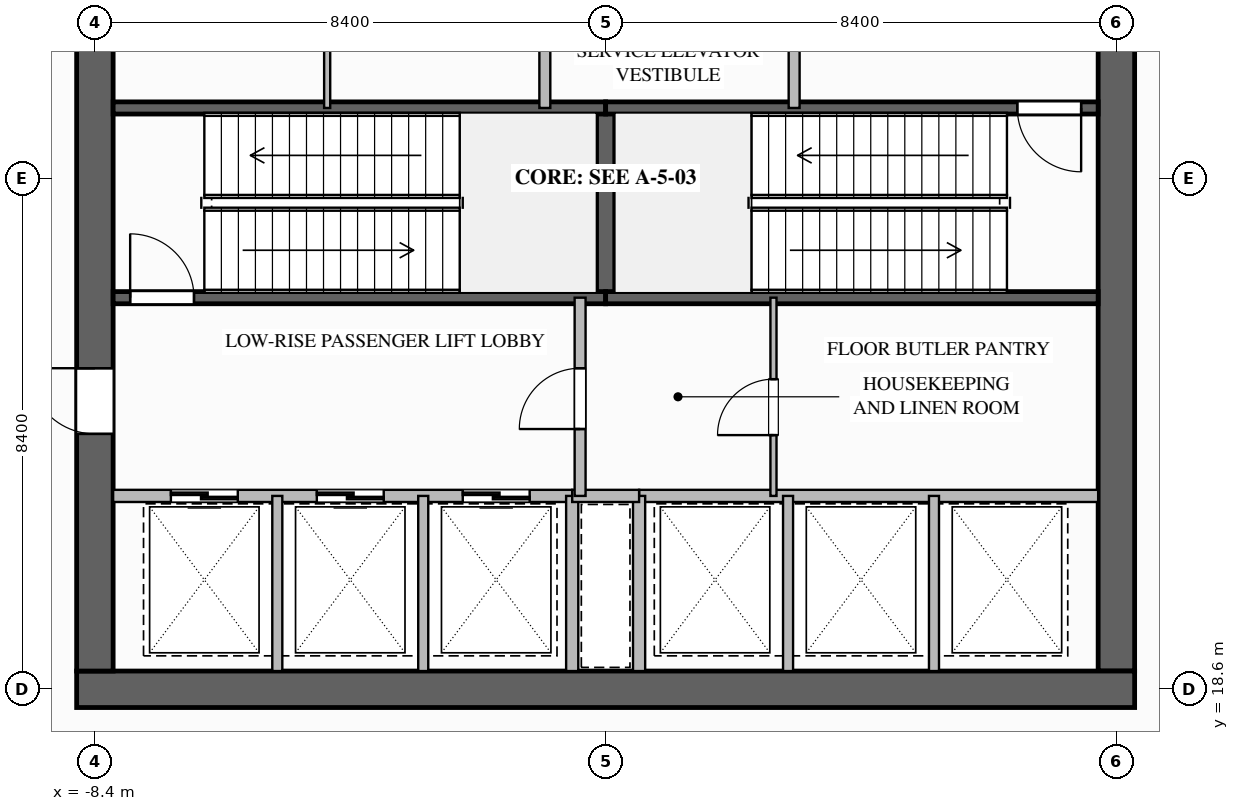
"""IFC4 building model, lengths in metres.
Left out: names, types, materials, properties, quantities, classifications, styles, units other than length and angle.
Written with IfcOpenShell. Run it as: python <this file> out.ifc"""

import sys

from ifc_helpers import new_model, si_unit, direction, frame, frame_2d, origin, place, context, subcontext, project, spatial, rectangle, extrude, element, fill, save


model = new_model("IFC4")
c1 = context("Model", 3, precision=1e-05, world=origin(), true_north=direction((0.0, 1.0)))
c2 = subcontext(c1, "Body", "Model", "MODEL_VIEW")
j1 = project(units=[si_unit("LENGTHUNIT", "METRE"), si_unit("PLANEANGLEUNIT", "RADIAN")], contexts=[c1])
p1 = place(None, origin())
s1 = spatial("IfcSite", under=j1, at=p1, CompositionType="ELEMENT")
p2 = place(p1, origin())
s2 = spatial("IfcBuilding", under=s1, at=p2, CompositionType="ELEMENT")
p3 = place(p2, frame((0.0, 0.0, 27.6)))
s3 = spatial("IfcBuildingStorey", under=s2, at=p3, CompositionType="ELEMENT", Elevation=27.6)
p4 = place(p3, frame((8.4, 35.1, 0.0), z_axis=(0.0, 0.0, 1.0), x_axis=(0.0, -1.0, 0.0)))
e1 = element("IfcWall", 1, at=p4, inside=s3, PredefinedType="SHEAR", context=c2, shape_type="SweptSolid", body=[
    extrude(rectangle(XDim=16.2, YDim=0.6, at=frame_2d((8.1, 0.0))), origin(), (0.0, 0.0, 1.0), 5.6),
])
p5 = place(p4, frame((3.08, 0.0, 0.0)))
e2 = element("IfcOpeningElement", 2, at=p5, cuts=e1, PredefinedType="OPENING", context=c2, shape_type="SweptSolid", body=[
    extrude(rectangle(XDim=1.12, YDim=2.1, at=frame_2d((0.56, 1.05))), frame((0.0, 0.31, 0.0), z_axis=(0.0, -1.0, 0.0), x_axis=(1.0, 0.0, 0.0)), (0.0, 0.0, 1.0), 0.62),
])
p6 = place(p3, frame((8.7, 18.6, 0.0), z_axis=(0.0, 0.0, 1.0), x_axis=(-1.0, 0.0, 0.0)))
e3 = element("IfcWall", 3, at=p6, inside=s3, PredefinedType="SHEAR", context=c2, shape_type="SweptSolid", body=[
    extrude(rectangle(XDim=17.4, YDim=0.6, at=frame_2d((8.7, 0.0))), origin(), (0.0, 0.0, 1.0), 5.6),
])
p7 = place(p3, frame((-8.4, 18.9, 0.0), z_axis=(0.0, 0.0, 1.0), x_axis=(0.0, 1.0, 0.0)))
e4 = element("IfcWall", 4, at=p7, inside=s3, PredefinedType="SHEAR", context=c2, shape_type="SweptSolid", body=[
    extrude(rectangle(XDim=16.2, YDim=0.6, at=frame_2d((8.1, 0.0))), origin(), (0.0, 0.0, 1.0), 5.6),
])
p8 = place(p7, frame((3.9, 0.0, 0.0)))
e5 = element("IfcOpeningElement", 5, at=p8, cuts=e4, PredefinedType="OPENING", context=c2, shape_type="SweptSolid", body=[
    extrude(rectangle(XDim=1.08, YDim=2.04, at=frame_2d((0.54, 1.02))), frame((0.0, 0.31, 0.0), z_axis=(0.0, -1.0, 0.0), x_axis=(1.0, 0.0, 0.0)), (0.0, 0.0, 1.0), 0.62),
])
p9 = place(p3, frame((0.0, 25.04, 0.0), z_axis=(0.0, 0.0, 1.0), x_axis=(0.0, 1.0, 0.0)))
e6 = element("IfcWall", 6, at=p9, inside=s3, PredefinedType="SOLIDWALL", context=c2, shape_type="SweptSolid", body=[
    extrude(rectangle(XDim=3.12, YDim=0.3, at=frame_2d((1.56, 0.0))), origin(), (0.0, 0.0, 1.0), 5.32),
])
p10 = place(p3, frame((-8.1, 25.04, 0.0), z_axis=(0.0, 0.0, 1.0), x_axis=(1.0, 0.0, 0.0)))
e7 = element("IfcWall", 7, at=p10, inside=s3, PredefinedType="SOLIDWALL", context=c2, shape_type="SweptSolid", body=[
    extrude(rectangle(XDim=8.1, YDim=0.2, at=frame_2d((4.05, 0.0))), origin(), (0.0, 0.0, 1.0), 5.32),
])
p11 = place(p10, frame((0.28, 0.0, 0.0)))
e8 = element("IfcOpeningElement", 8, at=p11, cuts=e7, PredefinedType="OPENING", context=c2, shape_type="SweptSolid", body=[
    extrude(rectangle(XDim=1.05, YDim=2.1, at=frame_2d((0.525, 1.05))), frame((0.0, 0.11, 0.0), z_axis=(0.0, -1.0, 0.0), x_axis=(1.0, 0.0, 0.0)), (0.0, 0.0, 1.0), 0.22),
])
for number, where, z_axis, x_axis in (
    (9, (-8.1, 28.16, 0.0), (0.0, 0.0, 1.0), (1.0, 0.0, 0.0)),
    (10, (0.0, 25.04, 0.0), (0.0, 0.0, 1.0), (1.0, 0.0, 0.0)),
):
    element("IfcWall", number, at=place(p3, frame(where, z_axis=z_axis, x_axis=x_axis)), inside=s3, PredefinedType="SOLIDWALL", context=c2, shape_type="SweptSolid", body=[
        extrude(rectangle(XDim=8.1, YDim=0.2, at=frame_2d((4.05, 0.0))), origin(), (0.0, 0.0, 1.0), 5.32),
    ])
p12 = place(p3, frame((8.1, 28.16, 0.0), z_axis=(0.0, 0.0, 1.0), x_axis=(-1.0, 0.0, 0.0)))
e11 = element("IfcWall", 11, at=p12, inside=s3, PredefinedType="SOLIDWALL", context=c2, shape_type="SweptSolid", body=[
    extrude(rectangle(XDim=8.1, YDim=0.2, at=frame_2d((4.05, 0.0))), origin(), (0.0, 0.0, 1.0), 5.32),
])
p13 = place(p12, frame((0.28, 0.0, 0.0)))
e12 = element("IfcOpeningElement", 12, at=p13, cuts=e11, PredefinedType="OPENING", context=c2, shape_type="SweptSolid", body=[
    extrude(rectangle(XDim=1.05, YDim=2.1, at=frame_2d((0.525, 1.05))), frame((0.0, 0.11, 0.0), z_axis=(0.0, -1.0, 0.0), x_axis=(1.0, 0.0, 0.0)), (0.0, 0.0, 1.0), 0.22),
])
p14 = place(p3, frame((3.1, 28.16, 0.0), z_axis=(0.0, 0.0, 1.0), x_axis=(0.0, 1.0, 0.0)))
e13 = element("IfcWall", 13, at=p14, inside=s3, PredefinedType="SOLIDWALL", context=c2, shape_type="SweptSolid", body=[
    extrude(rectangle(XDim=4.06, YDim=0.18, at=frame_2d((2.03, 0.0))), origin(), (0.0, 0.0, 1.0), 5.32),
])
p15 = place(p14, frame((1.4, 0.0, 0.0)))
e14 = element("IfcOpeningElement", 14, at=p15, cuts=e13, PredefinedType="OPENING", context=c2, shape_type="SweptSolid", body=[
    extrude(rectangle(XDim=1.12, YDim=2.1, at=frame_2d((0.56, 1.05))), frame((0.0, 0.1, 0.0), z_axis=(0.0, -1.0, 0.0), x_axis=(1.0, 0.0, 0.0)), (0.0, 0.0, 1.0), 0.2),
])
p16 = place(p3, frame((-1.0, 28.16, 0.0), z_axis=(0.0, 0.0, 1.0), x_axis=(0.0, 1.0, 0.0)))
e15 = element("IfcWall", 15, at=p16, inside=s3, PredefinedType="SOLIDWALL", context=c2, shape_type="SweptSolid", body=[
    extrude(rectangle(XDim=4.02, YDim=0.18, at=frame_2d((2.01, 0.0))), origin(), (0.0, 0.0, 1.0), 5.32),
])
p17 = place(p16, frame((1.4, 0.0, 0.0)))
e16 = element("IfcOpeningElement", 16, at=p17, cuts=e15, PredefinedType="OPENING", context=c2, shape_type="SweptSolid", body=[
    extrude(rectangle(XDim=1.0, YDim=2.1, at=frame_2d((0.5, 1.05))), frame((0.0, 0.1, 0.0), z_axis=(0.0, -1.0, 0.0), x_axis=(1.0, 0.0, 0.0)), (0.0, 0.0, 1.0), 0.2),
])
p18 = place(p3, frame((-4.58, 28.16, 0.0), z_axis=(0.0, 0.0, 1.0), x_axis=(0.0, 1.0, 0.0)))
e17 = element("IfcWall", 17, at=p18, inside=s3, PredefinedType="PARTITIONING", context=c2, shape_type="SweptSolid", body=[
    extrude(rectangle(XDim=4.06, YDim=0.1, at=frame_2d((2.03, 0.0))), origin(), (0.0, 0.0, 1.0), 5.32),
])
p19 = place(p18, frame((1.2, 0.0, 0.0)))
e18 = element("IfcOpeningElement", 18, at=p19, cuts=e17, PredefinedType="OPENING", context=c2, shape_type="SweptSolid", body=[
    extrude(rectangle(XDim=0.92, YDim=2.1, at=frame_2d((0.46, 1.05))), frame((0.0, 0.06, 0.0), z_axis=(0.0, -1.0, 0.0), x_axis=(1.0, 0.0, 0.0)), (0.0, 0.0, 1.0), 0.12),
])
p20 = place(p3, frame((-0.55, 21.78, 0.0), z_axis=(0.0, 0.0, 1.0), x_axis=(-1.0, 0.0, 0.0)))
e19 = element("IfcWall", 19, at=p20, inside=s3, PredefinedType="SOLIDWALL", context=c2, shape_type="SweptSolid", body=[
    extrude(rectangle(XDim=7.55, YDim=0.2, at=frame_2d((3.775, 0.0))), origin(), (0.0, 0.0, 1.0), 5.32),
])
p21 = place(p20, frame((5.5, 0.0, 0.0)))
e20 = element("IfcOpeningElement", 20, at=p21, cuts=e19, PredefinedType="OPENING", context=c2, shape_type="SweptSolid", body=[
    extrude(rectangle(XDim=1.1, YDim=2.2, at=frame_2d((0.55, 1.1))), frame((0.0, 0.11, 0.0), z_axis=(0.0, -1.0, 0.0), x_axis=(1.0, 0.0, 0.0)), (0.0, 0.0, 1.0), 0.22),
])
p22 = place(p20, frame((3.1, 0.0, 0.0)))
e21 = element("IfcOpeningElement", 21, at=p22, cuts=e19, PredefinedType="OPENING", context=c2, shape_type="SweptSolid", body=[
    extrude(rectangle(XDim=1.1, YDim=2.2, at=frame_2d((0.55, 1.1))), frame((0.0, 0.11, 0.0), z_axis=(0.0, -1.0, 0.0), x_axis=(1.0, 0.0, 0.0)), (0.0, 0.0, 1.0), 0.22),
])
p23 = place(p20, frame((0.7, 0.0, 0.0)))
e22 = element("IfcOpeningElement", 22, at=p23, cuts=e19, PredefinedType="OPENING", context=c2, shape_type="SweptSolid", body=[
    extrude(rectangle(XDim=1.1, YDim=2.2, at=frame_2d((0.55, 1.1))), frame((0.0, 0.11, 0.0), z_axis=(0.0, -1.0, 0.0), x_axis=(1.0, 0.0, 0.0)), (0.0, 0.0, 1.0), 0.22),
])
for number, where, z_axis, x_axis in (
    (23, (-5.4, 18.9, 0.0), (0.0, 0.0, 1.0), (0.0, 1.0, 0.0)),
    (24, (-3.0, 18.9, 0.0), (0.0, 0.0, 1.0), (0.0, 1.0, 0.0)),
):
    element("IfcWall", number, at=place(p3, frame(where, z_axis=z_axis, x_axis=x_axis)), inside=s3, PredefinedType="PARTITIONING", context=c2, shape_type="SweptSolid", body=[
        extrude(rectangle(XDim=2.88, YDim=0.165, at=frame_2d((1.44, 0.0))), origin(), (0.0, 0.0, 1.0), 5.32),
    ])
p24 = place(p3, frame((-0.55, 18.9, 0.0), z_axis=(0.0, 0.0, 1.0), x_axis=(0.0, 1.0, 0.0)))
e25 = element("IfcWall", 25, at=p24, inside=s3, PredefinedType="SOLIDWALL", context=c2, shape_type="SweptSolid", body=[
    extrude(rectangle(XDim=2.88, YDim=0.2, at=frame_2d((1.44, 0.0))), origin(), (0.0, 0.0, 1.0), 5.32),
])
p25 = place(p3, frame((8.1, 21.78, 0.0), z_axis=(0.0, 0.0, 1.0), x_axis=(-1.0, 0.0, 0.0)))
e26 = element("IfcWall", 26, at=p25, inside=s3, PredefinedType="SOLIDWALL", context=c2, shape_type="SweptSolid", body=[
    extrude(rectangle(XDim=7.55, YDim=0.2, at=frame_2d((3.775, 0.0))), origin(), (0.0, 0.0, 1.0), 5.32),
])
p26 = place(p3, frame((0.55, 18.9, 0.0), z_axis=(0.0, 0.0, 1.0), x_axis=(0.0, 1.0, 0.0)))
e27 = element("IfcWall", 27, at=p26, inside=s3, PredefinedType="SOLIDWALL", context=c2, shape_type="SweptSolid", body=[
    extrude(rectangle(XDim=2.88, YDim=0.2, at=frame_2d((1.44, 0.0))), origin(), (0.0, 0.0, 1.0), 5.32),
])
for number, where, z_axis, x_axis in (
    (28, (3.0, 18.9, 0.0), (0.0, 0.0, 1.0), (0.0, 1.0, 0.0)),
    (29, (5.4, 18.9, 0.0), (0.0, 0.0, 1.0), (0.0, 1.0, 0.0)),
):
    element("IfcWall", number, at=place(p3, frame(where, z_axis=z_axis, x_axis=x_axis)), inside=s3, PredefinedType="PARTITIONING", context=c2, shape_type="SweptSolid", body=[
        extrude(rectangle(XDim=2.88, YDim=0.165, at=frame_2d((1.44, 0.0))), origin(), (0.0, 0.0, 1.0), 5.32),
    ])
p27 = place(p3, frame((-0.55, 21.78, 0.0), z_axis=(0.0, 0.0, 1.0), x_axis=(1.0, 0.0, 0.0)))
e30 = element("IfcWall", 30, at=p27, inside=s3, PredefinedType="SOLIDWALL", context=c2, shape_type="SweptSolid", body=[
    extrude(rectangle(XDim=1.1, YDim=0.2, at=frame_2d((0.55, 0.0))), origin(), (0.0, 0.0, 1.0), 5.32),
])
p28 = place(p3, frame((-0.42, 21.78, 0.0), z_axis=(0.0, 0.0, 1.0), x_axis=(0.0, 1.0, 0.0)))
e31 = element("IfcWall", 31, at=p28, inside=s3, PredefinedType="SOLIDWALL", context=c2, shape_type="SweptSolid", body=[
    extrude(rectangle(XDim=3.26, YDim=0.18, at=frame_2d((1.63, 0.0))), origin(), (0.0, 0.0, 1.0), 5.32),
])
p29 = place(p28, frame((1.1, 0.0, 0.0)))
e32 = element("IfcOpeningElement", 32, at=p29, cuts=e31, PredefinedType="OPENING", context=c2, shape_type="SweptSolid", body=[
    extrude(rectangle(XDim=1.0, YDim=2.1, at=frame_2d((0.5, 1.05))), frame((0.0, 0.1, 0.0), z_axis=(0.0, -1.0, 0.0), x_axis=(1.0, 0.0, 0.0)), (0.0, 0.0, 1.0), 0.2),
])
p30 = place(p3, frame((2.76, 21.78, 0.0), z_axis=(0.0, 0.0, 1.0), x_axis=(0.0, 1.0, 0.0)))
e33 = element("IfcWall", 33, at=p30, inside=s3, PredefinedType="PARTITIONING", context=c2, shape_type="SweptSolid", body=[
    extrude(rectangle(XDim=3.26, YDim=0.1, at=frame_2d((1.63, 0.0))), origin(), (0.0, 0.0, 1.0), 5.32),
])
p31 = place(p30, frame((1.0, 0.0, 0.0)))
e34 = element("IfcOpeningElement", 34, at=p31, cuts=e33, PredefinedType="OPENING", context=c2, shape_type="SweptSolid", body=[
    extrude(rectangle(XDim=0.92, YDim=2.1, at=frame_2d((0.46, 1.05))), frame((0.0, 0.06, 0.0), z_axis=(0.0, -1.0, 0.0), x_axis=(1.0, 0.0, 0.0)), (0.0, 0.0, 1.0), 0.12),
])
p32 = place(p11, origin())
e35 = element("IfcDoor", 35, at=p32, inside=s3, OperationType="SINGLE_SWING_LEFT", PredefinedType="DOOR", context=c2, shape_type="SweptSolid", body=[
    extrude(rectangle(XDim=1.05, YDim=2.1, at=frame_2d((0.525, 1.05))), frame((0.0, 0.025, 0.0), z_axis=(0.0, -1.0, 0.0), x_axis=(1.0, 0.0, 0.0)), (0.0, 0.0, 1.0), 0.05),
])
fill(e8, e35)
p33 = place(p13, origin())
e36 = element("IfcDoor", 36, at=p33, inside=s3, OperationType="SINGLE_SWING_LEFT", PredefinedType="DOOR", context=c2, shape_type="SweptSolid", body=[
    extrude(rectangle(XDim=1.05, YDim=2.1, at=frame_2d((0.525, 1.05))), frame((0.0, 0.025, 0.0), z_axis=(0.0, -1.0, 0.0), x_axis=(1.0, 0.0, 0.0)), (0.0, 0.0, 1.0), 0.05),
])
fill(e12, e36)
p34 = place(p21, origin())
e37 = element("IfcDoor", 37, at=p34, inside=s3, OperationType="SLIDING_TO_LEFT", PredefinedType="DOOR", context=c2, shape_type="SweptSolid", body=[
    extrude(rectangle(XDim=1.1, YDim=2.2, at=frame_2d((0.55, 1.1))), frame((0.0, 0.025, 0.0), z_axis=(0.0, -1.0, 0.0), x_axis=(1.0, 0.0, 0.0)), (0.0, 0.0, 1.0), 0.05),
])
fill(e20, e37)
p35 = place(p22, origin())
e38 = element("IfcDoor", 38, at=p35, inside=s3, OperationType="SLIDING_TO_LEFT", PredefinedType="DOOR", context=c2, shape_type="SweptSolid", body=[
    extrude(rectangle(XDim=1.1, YDim=2.2, at=frame_2d((0.55, 1.1))), frame((0.0, 0.025, 0.0), z_axis=(0.0, -1.0, 0.0), x_axis=(1.0, 0.0, 0.0)), (0.0, 0.0, 1.0), 0.05),
])
fill(e21, e38)
p36 = place(p23, origin())
e39 = element("IfcDoor", 39, at=p36, inside=s3, OperationType="SLIDING_TO_LEFT", PredefinedType="DOOR", context=c2, shape_type="SweptSolid", body=[
    extrude(rectangle(XDim=1.1, YDim=2.2, at=frame_2d((0.55, 1.1))), frame((0.0, 0.025, 0.0), z_axis=(0.0, -1.0, 0.0), x_axis=(1.0, 0.0, 0.0)), (0.0, 0.0, 1.0), 0.05),
])
fill(e22, e39)
p37 = place(p29, origin())
e40 = element("IfcDoor", 40, at=p37, inside=s3, OperationType="SINGLE_SWING_LEFT", PredefinedType="DOOR", context=c2, shape_type="SweptSolid", body=[
    extrude(rectangle(XDim=1.0, YDim=2.1, at=frame_2d((0.5, 1.05))), frame((0.0, 0.025, 0.0), z_axis=(0.0, -1.0, 0.0), x_axis=(1.0, 0.0, 0.0)), (0.0, 0.0, 1.0), 0.05),
])
fill(e32, e40)
p38 = place(p8, origin())
e41 = element("IfcDoor", 41, at=p38, inside=s3, OperationType="SINGLE_SWING_RIGHT", PredefinedType="DOOR", context=c2, shape_type="SweptSolid", body=[
    extrude(rectangle(XDim=1.08, YDim=2.04, at=frame_2d((0.54, 1.02))), frame((0.0, 0.025, 0.0), z_axis=(0.0, -1.0, 0.0), x_axis=(1.0, 0.0, 0.0)), (0.0, 0.0, 1.0), 0.05),
])
fill(e5, e41)
p39 = place(p31, origin())
e42 = element("IfcDoor", 42, at=p39, inside=s3, OperationType="SINGLE_SWING_LEFT", PredefinedType="DOOR", context=c2, shape_type="SweptSolid", body=[
    extrude(rectangle(XDim=0.92, YDim=2.1, at=frame_2d((0.46, 1.05))), frame((0.0, 0.025, 0.0), z_axis=(0.0, -1.0, 0.0), x_axis=(1.0, 0.0, 0.0)), (0.0, 0.0, 1.0), 0.05),
])
fill(e34, e42)
save(model, sys.argv[1])
